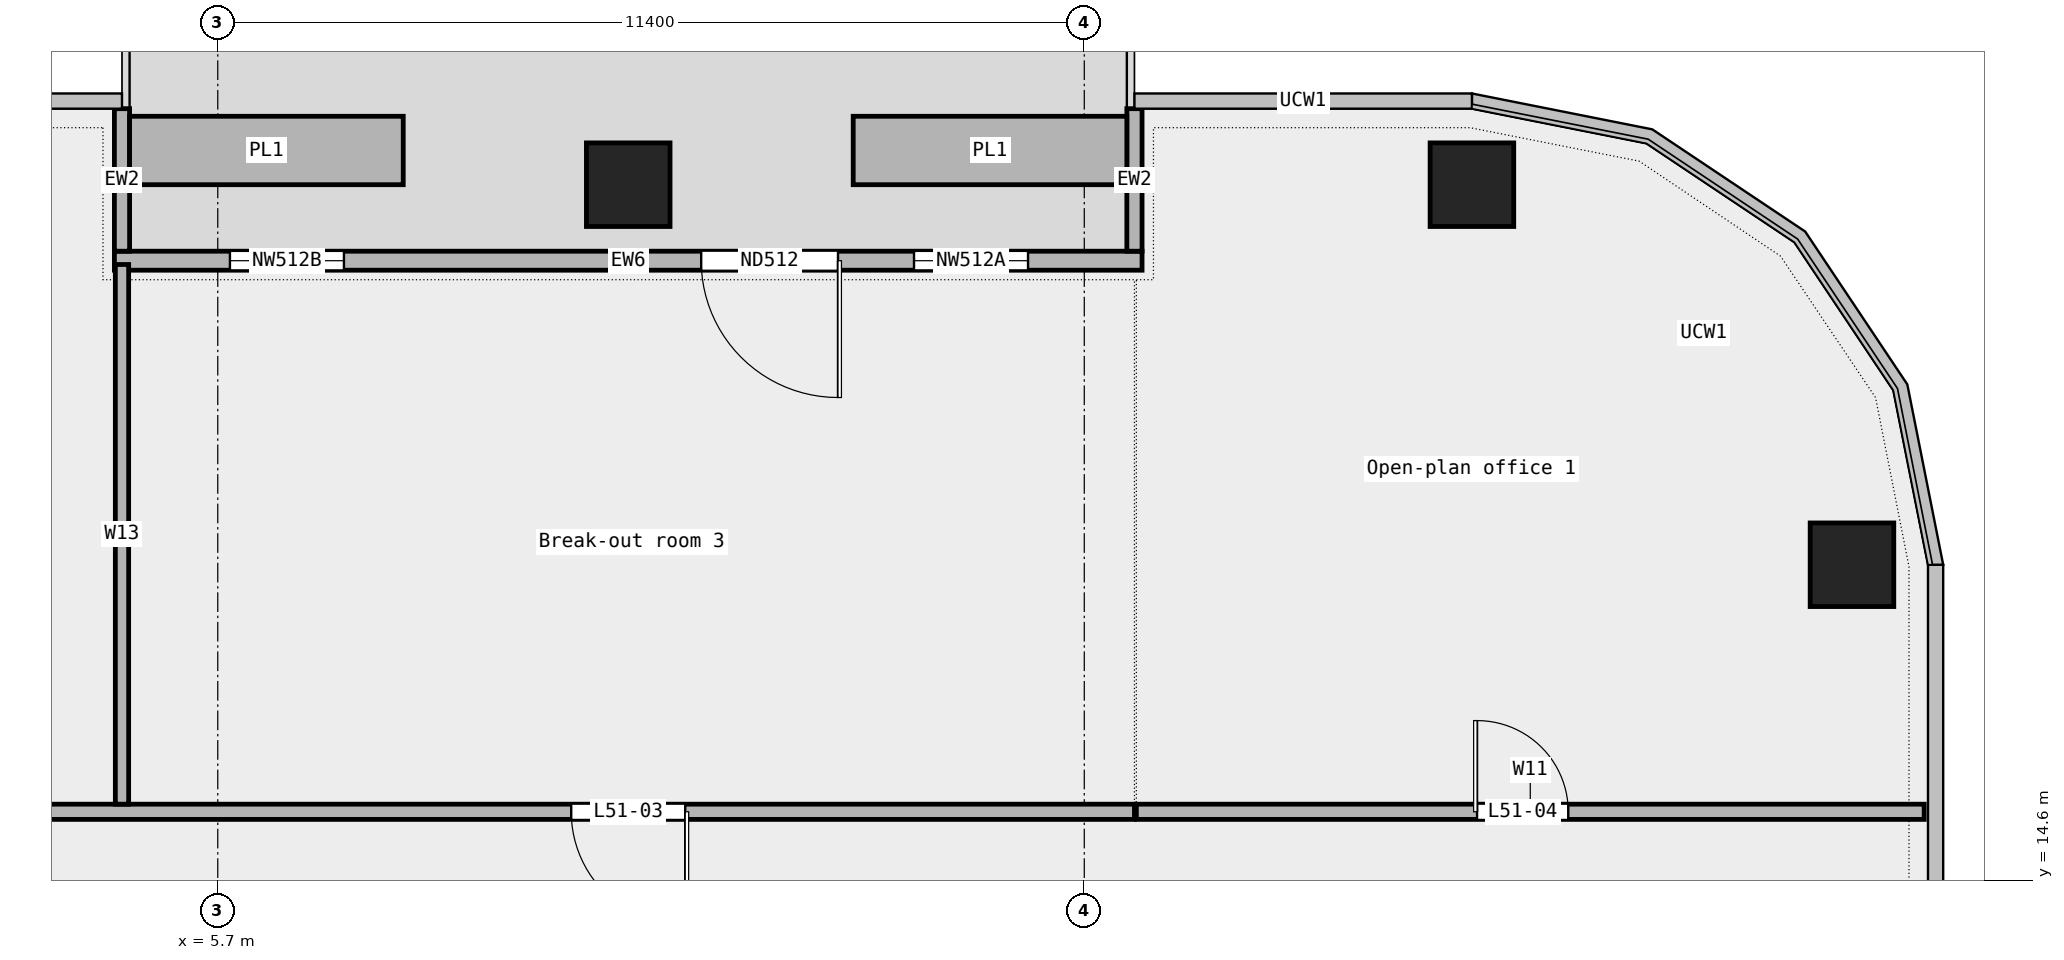
"""IFC4 building model, lengths in metres.
Left out: names, types, materials, properties, quantities, classifications, styles, units other than length and angle.
Written with IfcOpenShell. Run it as: python <this file> out.ifc"""

import sys

from ifc_helpers import new_model, si_unit, direction, frame, frame_2d, origin, origin_2d, place, context, subcontext, project, spatial, rectangle, extrude, element, fill, save


model = new_model("IFC4")
c1 = context("Model", 3, precision=1e-05, world=origin(), true_north=direction((0.0, 1.0)))
c2 = subcontext(c1, "Body", "Model", "MODEL_VIEW")
j1 = project(units=[si_unit("LENGTHUNIT", "METRE"), si_unit("PLANEANGLEUNIT", "RADIAN")], contexts=[c1])
p1 = place(None, origin())
s1 = spatial("IfcSite", under=j1, at=p1, CompositionType="ELEMENT")
p2 = place(p1, origin())
s2 = spatial("IfcBuilding", under=s1, at=p2, CompositionType="ELEMENT")
p3 = place(p2, frame((0.0, 0.0, 239.0)))
s3 = spatial("IfcBuildingStorey", under=s2, at=p3, CompositionType="ELEMENT", Elevation=239.0)
for number, where, z_axis, x_axis in (
    (1, (27.2, 18.75, 0.0), (0.0, 0.0, 1.0), (1.0, 0.0, 0.0)),
    (2, (22.2, 23.75, 0.0), (0.0, 0.0, 1.0), (1.0, 0.0, 0.0)),
    (3, (11.1, 23.75, 0.0), (0.0, 0.0, 1.0), (1.0, 0.0, 0.0)),
):
    element("IfcColumn", number, at=place(p3, frame(where, z_axis=z_axis, x_axis=x_axis)), inside=s3, PredefinedType="COLUMN", context=c2, shape_type="SweptSolid", body=[
        extrude(rectangle(XDim=1.1, YDim=1.1, at=origin_2d()), origin(), (0.0, 0.0, 1.0), 3.6),
    ])
p4 = place(p3, frame((17.86, 22.75, 0.0), z_axis=(0.0, 0.0, 1.0), x_axis=(-1.0, 0.0, 0.0)))
e4 = element("IfcWall", 4, at=p4, inside=s3, PredefinedType="STANDARD", context=c2, shape_type="SweptSolid", body=[
    extrude(rectangle(XDim=13.52, YDim=0.25, at=frame_2d((6.76, 0.0))), origin(), (0.0, 0.0, 1.0), 3.6),
])
p5 = place(p4, frame((1.5, 0.0, 0.45)))
e5 = element("IfcOpeningElement", 5, at=p5, cuts=e4, PredefinedType="OPENING", context=c2, shape_type="SweptSolid", body=[
    extrude(rectangle(XDim=1.5, YDim=2.4, at=frame_2d((0.75, 1.2))), frame((0.0, 0.137, 0.0), z_axis=(0.0, -1.0, 0.0), x_axis=(1.0, 0.0, 0.0)), (0.0, 0.0, 1.0), 0.274),
])
p6 = place(p4, frame((4.0, 0.0, 0.0)))
e6 = element("IfcOpeningElement", 6, at=p6, cuts=e4, PredefinedType="OPENING", context=c2, shape_type="SweptSolid", body=[
    extrude(rectangle(XDim=1.8, YDim=2.4, at=frame_2d((0.9, 1.2))), frame((0.0, 0.137, 0.0), z_axis=(0.0, -1.0, 0.0), x_axis=(1.0, 0.0, 0.0)), (0.0, 0.0, 1.0), 0.274),
])
p7 = place(p4, frame((10.5, 0.0, 0.45)))
e7 = element("IfcOpeningElement", 7, at=p7, cuts=e4, PredefinedType="OPENING", context=c2, shape_type="SweptSolid", body=[
    extrude(rectangle(XDim=1.5, YDim=2.4, at=frame_2d((0.75, 1.2))), frame((0.0, 0.137, 0.0), z_axis=(0.0, -1.0, 0.0), x_axis=(1.0, 0.0, 0.0)), (0.0, 0.0, 1.0), 0.274),
])
for number, where, z_axis, x_axis in (
    (8, (17.76, 24.75, 0.0), (0.0, 0.0, 1.0), (0.0, -1.0, 0.0)),
    (9, (4.44, 24.75, 0.0), (0.0, 0.0, 1.0), (0.0, -1.0, 0.0)),
):
    element("IfcWall", number, at=place(p3, frame(where, z_axis=z_axis, x_axis=x_axis)), inside=s3, PredefinedType="STANDARD", context=c2, shape_type="SweptSolid", body=[
        extrude(rectangle(XDim=1.875, YDim=0.2, at=frame_2d((0.938, 0.0))), origin(), (0.0, 0.0, 1.0), 3.6),
    ])
for number, where, z_axis, x_axis in (
    (10, (17.66, 24.2, 0.0), (0.0, 0.0, 1.0), (-1.0, 0.0, 0.0)),
    (11, (8.14, 24.2, 0.0), (0.0, 0.0, 1.0), (-1.0, 0.0, 0.0)),
):
    element("IfcWall", number, at=place(p3, frame(where, z_axis=z_axis, x_axis=x_axis)), inside=s3, PredefinedType="STANDARD", context=c2, shape_type="SweptSolid", body=[
        extrude(rectangle(XDim=3.6, YDim=0.9, at=frame_2d((1.8, 0.0))), origin(), (0.0, 0.0, 1.0), 0.7),
    ])
p8 = place(p3, frame((-28.15, 15.5, 0.0), z_axis=(0.0, 0.0, 1.0), x_axis=(1.0, 0.0, 0.0)))
e12 = element("IfcWall", 12, at=p8, inside=s3, PredefinedType="PARTITIONING", context=c2, shape_type="SweptSolid", body=[
    extrude(rectangle(XDim=45.91, YDim=0.2, at=frame_2d((22.955, 0.0))), origin(), (0.0, 0.0, 1.0), 3.6),
])
p9 = place(p8, frame((38.5, 0.0, 0.0)))
e13 = element("IfcOpeningElement", 13, at=p9, cuts=e12, PredefinedType="OPENING", context=c2, shape_type="SweptSolid", body=[
    extrude(rectangle(XDim=1.5, YDim=2.1, at=frame_2d((0.75, 1.05))), frame((0.0, 0.112, 0.0), z_axis=(0.0, -1.0, 0.0), x_axis=(1.0, 0.0, 0.0)), (0.0, 0.0, 1.0), 0.224),
])
p10 = place(p8, frame((9.462, 0.0, 0.0)))
e14 = element("IfcOpeningElement", 14, at=p10, cuts=e12, PredefinedType="OPENING", context=c2, shape_type="SweptSolid", body=[
    extrude(rectangle(XDim=1.8, YDim=2.1, at=frame_2d((0.9, 1.05))), frame((0.0, 0.112, 0.0), z_axis=(0.0, -1.0, 0.0), x_axis=(1.0, 0.0, 0.0)), (0.0, 0.0, 1.0), 0.224),
])
p11 = place(p8, frame((25.808, 0.0, 0.0)))
e15 = element("IfcOpeningElement", 15, at=p11, cuts=e12, PredefinedType="OPENING", context=c2, shape_type="SweptSolid", body=[
    extrude(rectangle(XDim=1.5, YDim=2.1, at=frame_2d((0.75, 1.05))), frame((0.0, 0.112, 0.0), z_axis=(0.0, -1.0, 0.0), x_axis=(1.0, 0.0, 0.0)), (0.0, 0.0, 1.0), 0.224),
])
p12 = place(p3, frame((17.785, 15.5, 0.0), z_axis=(0.0, 0.0, 1.0), x_axis=(1.0, 0.0, 0.0)))
e16 = element("IfcWall", 16, at=p12, inside=s3, PredefinedType="PARTITIONING", context=c2, shape_type="SweptSolid", body=[
    extrude(rectangle(XDim=10.365, YDim=0.2, at=frame_2d((5.183, 0.0))), origin(), (0.0, 0.0, 1.0), 3.6),
])
p13 = place(p12, frame((4.482, 0.0, 0.0)))
e17 = element("IfcOpeningElement", 17, at=p13, cuts=e16, PredefinedType="OPENING", context=c2, shape_type="SweptSolid", body=[
    extrude(rectangle(XDim=1.2, YDim=2.1, at=frame_2d((0.6, 1.05))), frame((0.0, 0.112, 0.0), z_axis=(0.0, -1.0, 0.0), x_axis=(1.0, 0.0, 0.0)), (0.0, 0.0, 1.0), 0.224),
])
p14 = place(p3, frame((4.44, 15.6, 0.0), z_axis=(0.0, 0.0, 1.0), x_axis=(0.0, 1.0, 0.0)))
e18 = element("IfcWall", 18, at=p14, inside=s3, PredefinedType="PARTITIONING", context=c2, shape_type="SweptSolid", body=[
    extrude(rectangle(XDim=7.1, YDim=0.175, at=frame_2d((3.55, 0.0))), origin(), (0.0, 0.0, 1.0), 3.6),
])
p15 = place(p5, origin())
e19 = element("IfcWindow", 19, at=p15, inside=s3, PartitioningType="SINGLE_PANEL", PredefinedType="WINDOW", context=c2, shape_type="SweptSolid", body=[
    extrude(rectangle(XDim=1.5, YDim=2.4, at=frame_2d((0.75, 1.2))), frame((0.0, 0.03, 0.0), z_axis=(0.0, -1.0, 0.0), x_axis=(1.0, 0.0, 0.0)), (0.0, 0.0, 1.0), 0.06),
])
fill(e5, e19)
p16 = place(p6, origin())
e20 = element("IfcDoor", 20, at=p16, inside=s3, OperationType="DOUBLE_DOOR_SINGLE_SWING", PredefinedType="DOOR", context=c2, shape_type="SweptSolid", body=[
    extrude(rectangle(XDim=1.8, YDim=2.4, at=frame_2d((0.9, 1.2))), frame((0.0, 0.025, 0.0), z_axis=(0.0, -1.0, 0.0), x_axis=(1.0, 0.0, 0.0)), (0.0, 0.0, 1.0), 0.05),
])
fill(e6, e20)
p17 = place(p7, origin())
e21 = element("IfcWindow", 21, at=p17, inside=s3, PartitioningType="SINGLE_PANEL", PredefinedType="WINDOW", context=c2, shape_type="SweptSolid", body=[
    extrude(rectangle(XDim=1.5, YDim=2.4, at=frame_2d((0.75, 1.2))), frame((0.0, 0.03, 0.0), z_axis=(0.0, -1.0, 0.0), x_axis=(1.0, 0.0, 0.0)), (0.0, 0.0, 1.0), 0.06),
])
fill(e7, e21)
p18 = place(p9, origin())
e22 = element("IfcDoor", 22, at=p18, inside=s3, OperationType="DOUBLE_DOOR_SINGLE_SWING", PredefinedType="DOOR", context=c2, shape_type="SweptSolid", body=[
    extrude(rectangle(XDim=1.5, YDim=2.1, at=frame_2d((0.75, 1.05))), frame((0.0, 0.025, 0.0), z_axis=(0.0, -1.0, 0.0), x_axis=(1.0, 0.0, 0.0)), (0.0, 0.0, 1.0), 0.05),
])
fill(e13, e22)
p19 = place(p13, origin())
e23 = element("IfcDoor", 23, at=p19, inside=s3, OperationType="SINGLE_SWING_LEFT", PredefinedType="DOOR", context=c2, shape_type="SweptSolid", body=[
    extrude(rectangle(XDim=1.2, YDim=2.1, at=frame_2d((0.6, 1.05))), frame((0.0, 0.025, 0.0), z_axis=(0.0, -1.0, 0.0), x_axis=(1.0, 0.0, 0.0)), (0.0, 0.0, 1.0), 0.05),
])
fill(e17, e23)
save(model, sys.argv[1])
